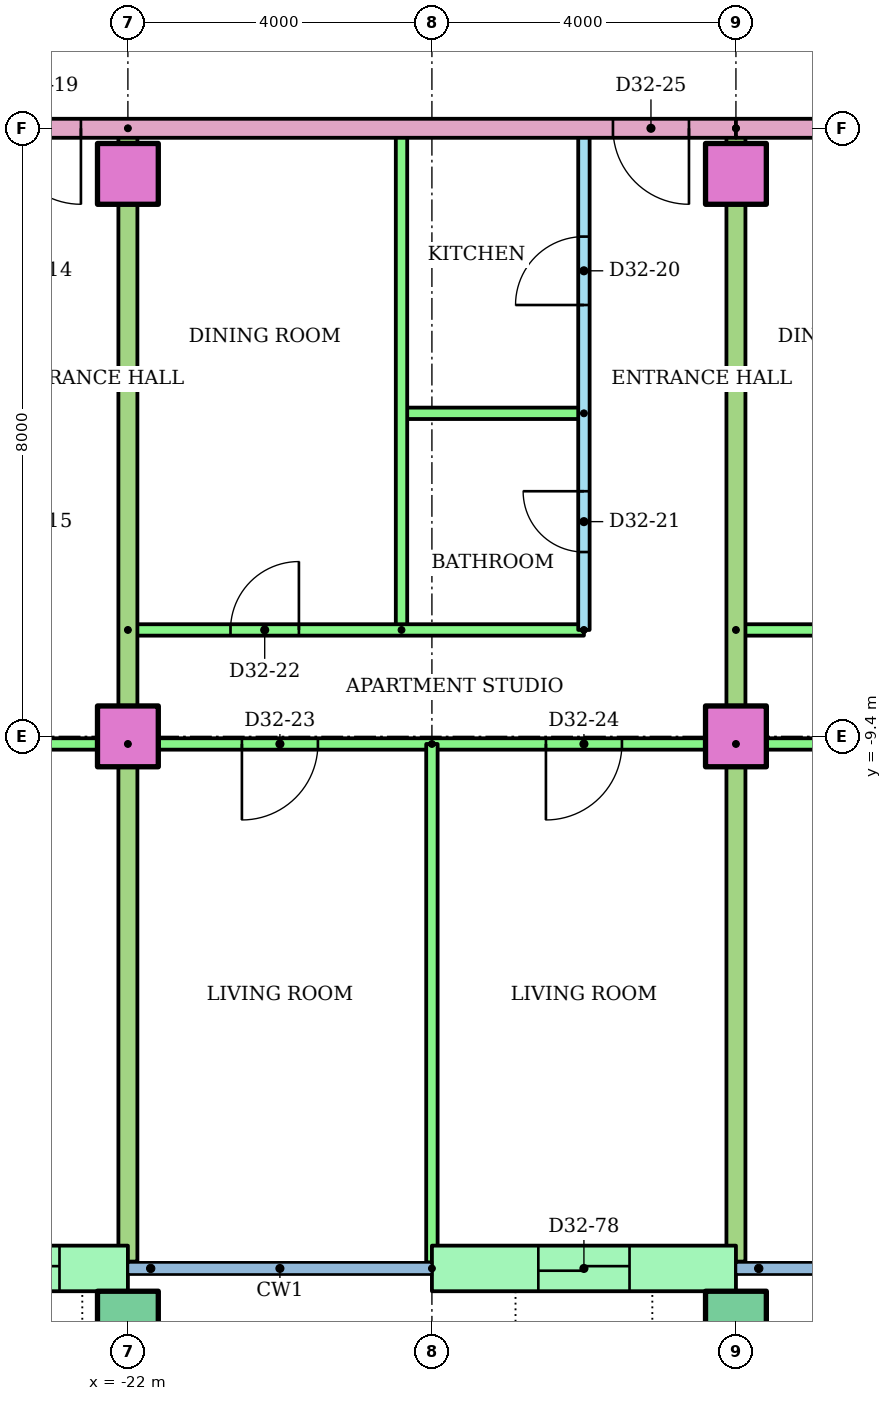
"""IFC4 building model, lengths in metres.
Left out: names, types, materials, properties, quantities, classifications, styles, units other than length and angle.
Written with IfcOpenShell. Run it as: python <this file> out.ifc"""

import sys

from ifc_helpers import new_model, si_unit, direction, frame, frame_2d, origin, origin_2d, place, context, subcontext, project, spatial, rectangle, hollow_rectangle, extrude, element, fill, save


model = new_model("IFC4")
c1 = context("Model", 3, precision=1e-05, world=origin(), true_north=direction((0.0, 1.0)))
c2 = subcontext(c1, "Body", "Model", "MODEL_VIEW")
j1 = project(units=[si_unit("LENGTHUNIT", "METRE"), si_unit("PLANEANGLEUNIT", "RADIAN")], contexts=[c1])
p1 = place(None, origin())
s1 = spatial("IfcSite", under=j1, at=p1, CompositionType="ELEMENT")
p2 = place(p1, origin())
s2 = spatial("IfcBuilding", under=s1, at=p2, CompositionType="ELEMENT")
p3 = place(p2, frame((0.0, 0.0, 126.2)))
s3 = spatial("IfcBuildingStorey", under=s2, at=p3, CompositionType="ELEMENT", Elevation=126.2)
for number, where in (
    (1, (-22.0, -17.1, 0.0)),
    (2, (-14.0, -17.1, 0.0)),
):
    element("IfcColumn", number, at=place(p3, frame(where)), inside=s3, PredefinedType="COLUMN", context=c2, shape_type="SweptSolid", body=[
        extrude(hollow_rectangle(XDim=0.8, YDim=0.8, WallThickness=0.04, at=origin_2d()), origin(), (0.0, 0.0, 1.0), 3.2),
    ])
for number, where in (
    (3, (-22.0, -9.4, 0.0)),
    (4, (-14.0, -9.4, 0.0)),
    (5, (-22.0, -2.0, 0.0)),
    (6, (-14.0, -2.0, 0.0)),
):
    element("IfcColumn", number, at=place(p3, frame(where)), inside=s3, PredefinedType="COLUMN", context=c2, shape_type="SweptSolid", body=[
        extrude(rectangle(XDim=0.8, YDim=0.8, at=origin_2d()), origin(), (0.0, 0.0, 1.0), 3.2),
    ])
p4 = place(p3, frame((-25.0, -16.4, 0.0)))
e7 = element("IfcWall", 7, at=p4, inside=s3, PredefinedType="STANDARD", context=c2, shape_type="SweptSolid", body=[
    extrude(rectangle(XDim=3.0, YDim=0.6, at=frame_2d((1.5, 0.0))), origin(), (0.0, 0.0, 1.0), 2.92),
])
p5 = place(p4, frame((0.9, 0.0, 0.0)))
e8 = element("IfcOpeningElement", 8, at=p5, cuts=e7, PredefinedType="OPENING", context=c2, shape_type="SweptSolid", body=[
    extrude(rectangle(XDim=1.2, YDim=2.1, at=frame_2d((0.6, 1.05))), frame((0.0, 0.31, 0.0), z_axis=(0.0, -1.0, 0.0), x_axis=(1.0, 0.0, 0.0)), (0.0, 0.0, 1.0), 0.62),
])
p6 = place(p3, frame((-18.0, -16.4, 0.0)))
e9 = element("IfcWall", 9, at=p6, inside=s3, PredefinedType="STANDARD", context=c2, shape_type="SweptSolid", body=[
    extrude(rectangle(XDim=4.0, YDim=0.6, at=frame_2d((2.0, 0.0))), origin(), (0.0, 0.0, 1.0), 2.92),
])
p7 = place(p6, frame((1.4, 0.0, 0.0)))
e10 = element("IfcOpeningElement", 10, at=p7, cuts=e9, PredefinedType="OPENING", context=c2, shape_type="SweptSolid", body=[
    extrude(rectangle(XDim=1.2, YDim=2.1, at=frame_2d((0.6, 1.05))), frame((0.0, 0.31, 0.0), z_axis=(0.0, -1.0, 0.0), x_axis=(1.0, 0.0, 0.0)), (0.0, 0.0, 1.0), 0.62),
])
p8 = place(p3, frame((-22.0, -9.5, 0.0), z_axis=(0.0, 0.0, 1.0), x_axis=(-1.0, 0.0, 0.0)))
e11 = element("IfcWall", 11, at=p8, inside=s3, PredefinedType="PARTITIONING", context=c2, shape_type="SweptSolid", body=[
    extrude(rectangle(XDim=10.72, YDim=0.15, at=frame_2d((5.36, 0.0))), origin(), (0.0, 0.0, 1.0), 2.4),
])
p9 = place(p8, frame((8.618, 0.0, 0.0)))
e12 = element("IfcOpeningElement", 12, at=p9, cuts=e11, PredefinedType="OPENING", context=c2, shape_type="SweptSolid", body=[
    extrude(rectangle(XDim=1.0, YDim=2.1, at=frame_2d((0.5, 1.05))), frame((0.0, 0.085, 0.0), z_axis=(0.0, -1.0, 0.0), x_axis=(1.0, 0.0, 0.0)), (0.0, 0.0, 1.0), 0.17),
])
p10 = place(p8, frame((2.5, 0.0, 0.0)))
e13 = element("IfcOpeningElement", 13, at=p10, cuts=e11, PredefinedType="OPENING", context=c2, shape_type="SweptSolid", body=[
    extrude(rectangle(XDim=1.0, YDim=2.1, at=frame_2d((0.5, 1.05))), frame((0.0, 0.085, 0.0), z_axis=(0.0, -1.0, 0.0), x_axis=(1.0, 0.0, 0.0)), (0.0, 0.0, 1.0), 0.17),
])
p11 = place(p3, frame((-16.0, -8.0, 0.0), z_axis=(0.0, 0.0, 1.0), x_axis=(0.0, 1.0, 0.0)))
e14 = element("IfcWall", 14, at=p11, inside=s3, PredefinedType="PARTITIONING", context=c2, shape_type="SweptSolid", body=[
    extrude(rectangle(XDim=6.6, YDim=0.15, at=frame_2d((3.3, 0.0))), origin(), (0.0, 0.0, 1.0), 2.4),
])
p12 = place(p11, frame((4.275, 0.0, 0.0)))
e15 = element("IfcOpeningElement", 15, at=p12, cuts=e14, PredefinedType="OPENING", context=c2, shape_type="SweptSolid", body=[
    extrude(rectangle(XDim=0.9, YDim=2.1, at=frame_2d((0.45, 1.05))), frame((0.0, 0.085, 0.0), z_axis=(0.0, -1.0, 0.0), x_axis=(1.0, 0.0, 0.0)), (0.0, 0.0, 1.0), 0.17),
])
p13 = place(p11, frame((1.025, 0.0, 0.0)))
e16 = element("IfcOpeningElement", 16, at=p13, cuts=e14, PredefinedType="OPENING", context=c2, shape_type="SweptSolid", body=[
    extrude(rectangle(XDim=0.8, YDim=2.1, at=frame_2d((0.4, 1.05))), frame((0.0, 0.085, 0.0), z_axis=(0.0, -1.0, 0.0), x_axis=(1.0, 0.0, 0.0)), (0.0, 0.0, 1.0), 0.17),
])
p14 = place(p3, frame((-16.0, -5.15, 0.0), z_axis=(0.0, 0.0, 1.0), x_axis=(-1.0, 0.0, 0.0)))
e17 = element("IfcWall", 17, at=p14, inside=s3, PredefinedType="PARTITIONING", context=c2, shape_type="SweptSolid", body=[
    extrude(rectangle(XDim=2.4, YDim=0.15, at=frame_2d((1.2, 0.0))), origin(), (0.0, 0.0, 1.0), 2.4),
])
p15 = place(p3, frame((-18.4, -8.0, 0.0), z_axis=(0.0, 0.0, 1.0), x_axis=(0.0, 1.0, 0.0)))
e18 = element("IfcWall", 18, at=p15, inside=s3, PredefinedType="PARTITIONING", context=c2, shape_type="SweptSolid", body=[
    extrude(rectangle(XDim=6.6, YDim=0.15, at=frame_2d((3.3, 0.0))), origin(), (0.0, 0.0, 1.0), 2.4),
])
p16 = place(p3, frame((-22.0, -8.0, 0.0)))
e19 = element("IfcWall", 19, at=p16, inside=s3, PredefinedType="PARTITIONING", context=c2, shape_type="SweptSolid", body=[
    extrude(rectangle(XDim=6.0, YDim=0.15, at=frame_2d((3.0, 0.0))), origin(), (0.0, 0.0, 1.0), 2.4),
])
p17 = place(p16, frame((1.35, 0.0, 0.0)))
e20 = element("IfcOpeningElement", 20, at=p17, cuts=e19, PredefinedType="OPENING", context=c2, shape_type="SweptSolid", body=[
    extrude(rectangle(XDim=0.9, YDim=2.1, at=frame_2d((0.45, 1.05))), frame((0.0, 0.085, 0.0), z_axis=(0.0, -1.0, 0.0), x_axis=(1.0, 0.0, 0.0)), (0.0, 0.0, 1.0), 0.17),
])
p18 = place(p3, frame((-14.0, -9.5, 0.0), z_axis=(0.0, 0.0, 1.0), x_axis=(-1.0, 0.0, 0.0)))
e21 = element("IfcWall", 21, at=p18, inside=s3, PredefinedType="PARTITIONING", context=c2, shape_type="SweptSolid", body=[
    extrude(rectangle(XDim=8.0, YDim=0.15, at=frame_2d((4.0, 0.0))), origin(), (0.0, 0.0, 1.0), 2.4),
])
p19 = place(p18, frame((5.5, 0.0, 0.0)))
e22 = element("IfcOpeningElement", 22, at=p19, cuts=e21, PredefinedType="OPENING", context=c2, shape_type="SweptSolid", body=[
    extrude(rectangle(XDim=1.0, YDim=2.1, at=frame_2d((0.5, 1.05))), frame((0.0, 0.085, 0.0), z_axis=(0.0, -1.0, 0.0), x_axis=(1.0, 0.0, 0.0)), (0.0, 0.0, 1.0), 0.17),
])
p20 = place(p18, frame((1.5, 0.0, 0.0)))
e23 = element("IfcOpeningElement", 23, at=p20, cuts=e21, PredefinedType="OPENING", context=c2, shape_type="SweptSolid", body=[
    extrude(rectangle(XDim=1.0, YDim=2.1, at=frame_2d((0.5, 1.05))), frame((0.0, 0.085, 0.0), z_axis=(0.0, -1.0, 0.0), x_axis=(1.0, 0.0, 0.0)), (0.0, 0.0, 1.0), 0.17),
])
p21 = place(p3, frame((-18.0, -9.5, 0.0), z_axis=(0.0, 0.0, 1.0), x_axis=(0.0, -1.0, 0.0)))
e24 = element("IfcWall", 24, at=p21, inside=s3, PredefinedType="PARTITIONING", context=c2, shape_type="SweptSolid", body=[
    extrude(rectangle(XDim=6.821, YDim=0.15, at=frame_2d((3.411, 0.0))), origin(), (0.0, 0.0, 1.0), 2.4),
])
p22 = place(p3, frame((-22.0, -1.4, 0.0), z_axis=(0.0, 0.0, 1.0), x_axis=(0.0, -1.0, 0.0)))
e25 = element("IfcWall", 25, at=p22, inside=s3, PredefinedType="PARTITIONING", context=c2, shape_type="SweptSolid", body=[
    extrude(rectangle(XDim=14.91, YDim=0.25, at=frame_2d((7.455, 0.0))), origin(), (0.0, 0.0, 1.0), 2.4),
])
p23 = place(p3, frame((-14.0, -8.0, 0.0)))
e26 = element("IfcWall", 26, at=p23, inside=s3, PredefinedType="PARTITIONING", context=c2, shape_type="SweptSolid", body=[
    extrude(rectangle(XDim=14.0, YDim=0.15, at=frame_2d((7.0, 0.0))), origin(), (0.0, 0.0, 1.0), 2.4),
])
p24 = place(p23, frame((8.775, 0.0, 0.0)))
e27 = element("IfcOpeningElement", 27, at=p24, cuts=e26, PredefinedType="OPENING", context=c2, shape_type="SweptSolid", body=[
    extrude(rectangle(XDim=0.9, YDim=2.1, at=frame_2d((0.45, 1.05))), frame((0.0, 0.085, 0.0), z_axis=(0.0, -1.0, 0.0), x_axis=(1.0, 0.0, 0.0)), (0.0, 0.0, 1.0), 0.17),
])
p25 = place(p23, frame((4.525, 0.0, 0.0)))
e28 = element("IfcOpeningElement", 28, at=p25, cuts=e26, PredefinedType="OPENING", context=c2, shape_type="SweptSolid", body=[
    extrude(rectangle(XDim=0.9, YDim=2.1, at=frame_2d((0.45, 1.05))), frame((0.0, 0.085, 0.0), z_axis=(0.0, -1.0, 0.0), x_axis=(1.0, 0.0, 0.0)), (0.0, 0.0, 1.0), 0.17),
])
p26 = place(p23, frame((1.1, 0.0, 0.0)))
e29 = element("IfcOpeningElement", 29, at=p26, cuts=e26, PredefinedType="OPENING", context=c2, shape_type="SweptSolid", body=[
    extrude(rectangle(XDim=0.9, YDim=2.1, at=frame_2d((0.45, 1.05))), frame((0.0, 0.085, 0.0), z_axis=(0.0, -1.0, 0.0), x_axis=(1.0, 0.0, 0.0)), (0.0, 0.0, 1.0), 0.17),
])
p27 = place(p3, frame((2.0, -9.5, 0.0), z_axis=(0.0, 0.0, 1.0), x_axis=(-1.0, 0.0, 0.0)))
e30 = element("IfcWall", 30, at=p27, inside=s3, PredefinedType="PARTITIONING", context=c2, shape_type="SweptSolid", body=[
    extrude(rectangle(XDim=16.0, YDim=0.15, at=frame_2d((8.0, 0.0))), origin(), (0.0, 0.0, 1.0), 2.4),
])
p28 = place(p27, frame((13.55, 0.0, 0.0)))
e31 = element("IfcOpeningElement", 31, at=p28, cuts=e30, PredefinedType="OPENING", context=c2, shape_type="SweptSolid", body=[
    extrude(rectangle(XDim=0.9, YDim=2.1, at=frame_2d((0.45, 1.05))), frame((0.0, 0.085, 0.0), z_axis=(0.0, -1.0, 0.0), x_axis=(1.0, 0.0, 0.0)), (0.0, 0.0, 1.0), 0.17),
])
p29 = place(p27, frame((9.5, 0.0, 0.0)))
e32 = element("IfcOpeningElement", 32, at=p29, cuts=e30, PredefinedType="OPENING", context=c2, shape_type="SweptSolid", body=[
    extrude(rectangle(XDim=1.0, YDim=2.1, at=frame_2d((0.5, 1.05))), frame((0.0, 0.085, 0.0), z_axis=(0.0, -1.0, 0.0), x_axis=(1.0, 0.0, 0.0)), (0.0, 0.0, 1.0), 0.17),
])
p30 = place(p27, frame((5.55, 0.0, 0.0)))
e33 = element("IfcOpeningElement", 33, at=p30, cuts=e30, PredefinedType="OPENING", context=c2, shape_type="SweptSolid", body=[
    extrude(rectangle(XDim=0.9, YDim=2.1, at=frame_2d((0.45, 1.05))), frame((0.0, 0.085, 0.0), z_axis=(0.0, -1.0, 0.0), x_axis=(1.0, 0.0, 0.0)), (0.0, 0.0, 1.0), 0.17),
])
p31 = place(p27, frame((1.55, 0.0, 0.0)))
e34 = element("IfcOpeningElement", 34, at=p31, cuts=e30, PredefinedType="OPENING", context=c2, shape_type="SweptSolid", body=[
    extrude(rectangle(XDim=0.9, YDim=2.1, at=frame_2d((0.45, 1.05))), frame((0.0, 0.085, 0.0), z_axis=(0.0, -1.0, 0.0), x_axis=(1.0, 0.0, 0.0)), (0.0, 0.0, 1.0), 0.17),
])
p32 = place(p3, frame((-14.0, -1.4, 0.0), z_axis=(0.0, 0.0, 1.0), x_axis=(0.0, -1.0, 0.0)))
e35 = element("IfcWall", 35, at=p32, inside=s3, PredefinedType="PARTITIONING", context=c2, shape_type="SweptSolid", body=[
    extrude(rectangle(XDim=14.91, YDim=0.25, at=frame_2d((7.455, 0.0))), origin(), (0.0, 0.0, 1.0), 2.4),
])
p33 = place(p3, frame((-14.0, -1.4, 0.0), z_axis=(0.0, 0.0, 1.0), x_axis=(-1.0, 0.0, 0.0)))
e36 = element("IfcWall", 36, at=p33, inside=s3, PredefinedType="PARTITIONING", context=c2, shape_type="SweptSolid", body=[
    extrude(rectangle(XDim=15.0, YDim=0.25, at=frame_2d((7.5, 0.0))), origin(), (0.0, 0.0, 1.0), 2.4),
])
p34 = place(p33, frame((8.618, 0.0, 0.0)))
e37 = element("IfcOpeningElement", 37, at=p34, cuts=e36, PredefinedType="OPENING", context=c2, shape_type="SweptSolid", body=[
    extrude(rectangle(XDim=1.0, YDim=2.1, at=frame_2d((0.5, 1.05))), frame((0.0, 0.135, 0.0), z_axis=(0.0, -1.0, 0.0), x_axis=(1.0, 0.0, 0.0)), (0.0, 0.0, 1.0), 0.27),
])
p35 = place(p33, frame((0.618, 0.0, 0.0)))
e38 = element("IfcOpeningElement", 38, at=p35, cuts=e36, PredefinedType="OPENING", context=c2, shape_type="SweptSolid", body=[
    extrude(rectangle(XDim=1.0, YDim=2.1, at=frame_2d((0.5, 1.05))), frame((0.0, 0.135, 0.0), z_axis=(0.0, -1.0, 0.0), x_axis=(1.0, 0.0, 0.0)), (0.0, 0.0, 1.0), 0.27),
])
p36 = place(p3, frame((14.0, -1.4, 0.0), z_axis=(0.0, 0.0, 1.0), x_axis=(-1.0, 0.0, 0.0)))
e39 = element("IfcWall", 39, at=p36, inside=s3, PredefinedType="PARTITIONING", context=c2, shape_type="SweptSolid", body=[
    extrude(rectangle(XDim=28.0, YDim=0.25, at=frame_2d((14.0, 0.0))), origin(), (0.0, 0.0, 1.0), 2.4),
])
p37 = place(p36, frame((12.618, 0.0, 0.0)))
e40 = element("IfcOpeningElement", 40, at=p37, cuts=e39, PredefinedType="OPENING", context=c2, shape_type="SweptSolid", body=[
    extrude(rectangle(XDim=1.0, YDim=2.1, at=frame_2d((0.5, 1.05))), frame((0.0, 0.135, 0.0), z_axis=(0.0, -1.0, 0.0), x_axis=(1.0, 0.0, 0.0)), (0.0, 0.0, 1.0), 0.27),
])
p38 = place(p36, frame((10.382, 0.0, 0.0)))
e41 = element("IfcOpeningElement", 41, at=p38, cuts=e39, PredefinedType="OPENING", context=c2, shape_type="SweptSolid", body=[
    extrude(rectangle(XDim=1.0, YDim=2.1, at=frame_2d((0.5, 1.05))), frame((0.0, 0.135, 0.0), z_axis=(0.0, -1.0, 0.0), x_axis=(1.0, 0.0, 0.0)), (0.0, 0.0, 1.0), 0.27),
])
p39 = place(p34, origin())
e42 = element("IfcDoor", 42, at=p39, inside=s3, OperationType="SINGLE_SWING_LEFT", PredefinedType="DOOR", context=c2, shape_type="SweptSolid", body=[
    extrude(rectangle(XDim=1.0, YDim=2.1, at=frame_2d((0.5, 1.05))), frame((0.0, 0.025, 0.0), z_axis=(0.0, -1.0, 0.0), x_axis=(1.0, 0.0, 0.0)), (0.0, 0.0, 1.0), 0.05),
])
fill(e37, e42)
p40 = place(p12, origin())
e43 = element("IfcDoor", 43, at=p40, inside=s3, OperationType="SINGLE_SWING_LEFT", PredefinedType="DOOR", context=c2, shape_type="SweptSolid", body=[
    extrude(rectangle(XDim=0.9, YDim=2.1, at=frame_2d((0.45, 1.05))), frame((0.0, 0.025, 0.0), z_axis=(0.0, -1.0, 0.0), x_axis=(1.0, 0.0, 0.0)), (0.0, 0.0, 1.0), 0.05),
])
fill(e15, e43)
p41 = place(p13, origin())
e44 = element("IfcDoor", 44, at=p41, inside=s3, OperationType="SINGLE_SWING_RIGHT", PredefinedType="DOOR", context=c2, shape_type="SweptSolid", body=[
    extrude(rectangle(XDim=0.8, YDim=2.1, at=frame_2d((0.4, 1.05))), frame((0.0, 0.025, 0.0), z_axis=(0.0, -1.0, 0.0), x_axis=(1.0, 0.0, 0.0)), (0.0, 0.0, 1.0), 0.05),
])
fill(e16, e44)
p42 = place(p17, origin())
e45 = element("IfcDoor", 45, at=p42, inside=s3, OperationType="SINGLE_SWING_RIGHT", PredefinedType="DOOR", context=c2, shape_type="SweptSolid", body=[
    extrude(rectangle(XDim=0.9, YDim=2.1, at=frame_2d((0.45, 1.05))), frame((0.0, 0.025, 0.0), z_axis=(0.0, -1.0, 0.0), x_axis=(1.0, 0.0, 0.0)), (0.0, 0.0, 1.0), 0.05),
])
fill(e20, e45)
p43 = place(p19, origin())
e46 = element("IfcDoor", 46, at=p43, inside=s3, OperationType="SINGLE_SWING_RIGHT", PredefinedType="DOOR", context=c2, shape_type="SweptSolid", body=[
    extrude(rectangle(XDim=1.0, YDim=2.1, at=frame_2d((0.5, 1.05))), frame((0.0, 0.025, 0.0), z_axis=(0.0, -1.0, 0.0), x_axis=(1.0, 0.0, 0.0)), (0.0, 0.0, 1.0), 0.05),
])
fill(e22, e46)
p44 = place(p20, origin())
e47 = element("IfcDoor", 47, at=p44, inside=s3, OperationType="SINGLE_SWING_RIGHT", PredefinedType="DOOR", context=c2, shape_type="SweptSolid", body=[
    extrude(rectangle(XDim=1.0, YDim=2.1, at=frame_2d((0.5, 1.05))), frame((0.0, 0.025, 0.0), z_axis=(0.0, -1.0, 0.0), x_axis=(1.0, 0.0, 0.0)), (0.0, 0.0, 1.0), 0.05),
])
fill(e23, e47)
p45 = place(p35, origin())
e48 = element("IfcDoor", 48, at=p45, inside=s3, OperationType="SINGLE_SWING_LEFT", PredefinedType="DOOR", context=c2, shape_type="SweptSolid", body=[
    extrude(rectangle(XDim=1.0, YDim=2.1, at=frame_2d((0.5, 1.05))), frame((0.0, 0.025, 0.0), z_axis=(0.0, -1.0, 0.0), x_axis=(1.0, 0.0, 0.0)), (0.0, 0.0, 1.0), 0.05),
])
fill(e38, e48)
p46 = place(p5, origin())
e49 = element("IfcDoor", 49, at=p46, inside=s3, OperationType="SLIDING_TO_LEFT", PredefinedType="DOOR", context=c2, shape_type="SweptSolid", body=[
    extrude(rectangle(XDim=1.2, YDim=2.1, at=frame_2d((0.6, 1.05))), frame((0.0, 0.025, 0.0), z_axis=(0.0, -1.0, 0.0), x_axis=(1.0, 0.0, 0.0)), (0.0, 0.0, 1.0), 0.05),
])
fill(e8, e49)
p47 = place(p7, origin())
e50 = element("IfcDoor", 50, at=p47, inside=s3, OperationType="SLIDING_TO_LEFT", PredefinedType="DOOR", context=c2, shape_type="SweptSolid", body=[
    extrude(rectangle(XDim=1.2, YDim=2.1, at=frame_2d((0.6, 1.05))), frame((0.0, 0.025, 0.0), z_axis=(0.0, -1.0, 0.0), x_axis=(1.0, 0.0, 0.0)), (0.0, 0.0, 1.0), 0.05),
])
fill(e10, e50)
save(model, sys.argv[1])
